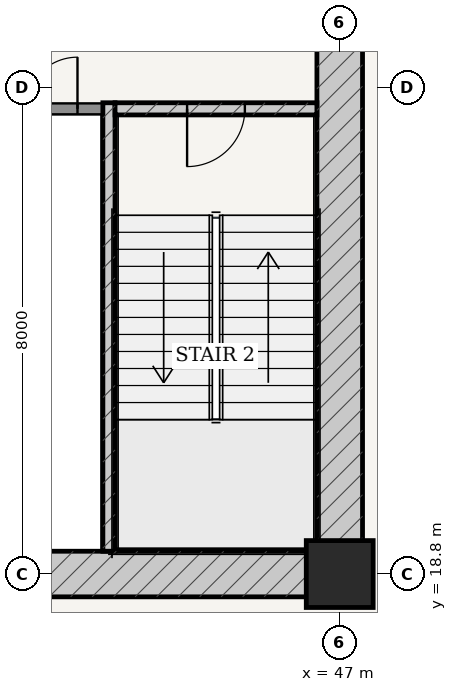
"""IFC4 building model, lengths in metres.
Left out: names, types, materials, properties, quantities, classifications, styles, units other than length and angle.
Written with IfcOpenShell. Run it as: python <this file> out.ifc"""

import sys

from ifc_helpers import new_model, si_unit, direction, frame, frame_2d, origin, origin_2d, place, context, subcontext, project, spatial, rectangle, extrude, source, transform, mapped, element, fill, save


model = new_model("IFC4")
c1 = context("Model", 3, precision=1e-05, world=origin(), true_north=direction((-0.2419218956, 0.970295726276)))
c2 = subcontext(c1, "Body", "Model", "MODEL_VIEW")
j1 = project(units=[si_unit("LENGTHUNIT", "METRE"), si_unit("PLANEANGLEUNIT", "RADIAN")], contexts=[c1])
p1 = place(None, origin())
s1 = spatial("IfcSite", under=j1, at=p1, CompositionType="ELEMENT")
p2 = place(p1, origin())
s2 = spatial("IfcBuilding", under=s1, at=p2, CompositionType="ELEMENT")
p3 = place(p2, frame((0.0, 0.0, 14.4)))
s3 = spatial("IfcBuildingStorey", under=s2, at=p3, CompositionType="ELEMENT", Elevation=14.4)
p4 = place(p3, frame((47.0, 18.8, 0.0), z_axis=(0.0, 0.0, 1.0), x_axis=(1.0, 0.0, 0.0)))
e1 = element("IfcColumn", 1, at=p4, inside=s3, PredefinedType="COLUMN", context=c2, shape_type="SweptSolid", body=[
    extrude(rectangle(XDim=1.1, YDim=1.1, at=origin_2d()), origin(), (0.0, 0.0, 1.0), 4.5),
])
p5 = place(p3, frame((28.625, 18.8, 0.0), z_axis=(0.0, 0.0, 1.0), x_axis=(1.0, 0.0, 0.0)))
e2 = element("IfcWall", 2, at=p5, inside=s3, PredefinedType="SHEAR", context=c2, shape_type="SweptSolid", body=[
    extrude(rectangle(XDim=18.75, YDim=0.75, at=frame_2d((9.375, 0.0))), origin(), (0.0, 0.0, 1.0), 4.05),
])
p6 = place(p5, frame((7.627, 0.0, 0.0)))
e3 = element("IfcOpeningElement", 3, at=p6, cuts=e2, PredefinedType="OPENING", context=c2, shape_type="SweptSolid", body=[
    extrude(rectangle(XDim=0.85, YDim=2.1, at=frame_2d((0.425, 1.05))), frame((0.0, 0.385, 0.0), z_axis=(0.0, -1.0, 0.0), x_axis=(1.0, 0.0, 0.0)), (0.0, 0.0, 1.0), 0.77),
])
p7 = place(p5, frame((10.673, 0.0, 0.0)))
e4 = element("IfcOpeningElement", 4, at=p7, cuts=e2, PredefinedType="OPENING", context=c2, shape_type="SweptSolid", body=[
    extrude(rectangle(XDim=0.85, YDim=2.1, at=frame_2d((0.425, 1.05))), frame((0.0, 0.385, 0.0), z_axis=(0.0, -1.0, 0.0), x_axis=(1.0, 0.0, 0.0)), (0.0, 0.0, 1.0), 0.77),
])
p8 = place(p3, frame((47.0, 19.175, 0.0), z_axis=(0.0, 0.0, 1.0), x_axis=(0.0, 1.0, 0.0)))
e5 = element("IfcWall", 5, at=p8, inside=s3, PredefinedType="SHEAR", context=c2, shape_type="SweptSolid", body=[
    extrude(rectangle(XDim=15.25, YDim=0.75, at=frame_2d((7.625, 0.0))), origin(), (0.0, 0.0, 1.0), 4.05),
])
p9 = place(p8, frame((9.875, 0.0, 0.0)))
e6 = element("IfcOpeningElement", 6, at=p9, cuts=e5, PredefinedType="OPENING", context=c2, shape_type="SweptSolid", body=[
    extrude(rectangle(XDim=1.5, YDim=2.2, at=frame_2d((0.75, 1.1))), frame((0.0, 0.385, 0.0), z_axis=(0.0, -1.0, 0.0), x_axis=(1.0, 0.0, 0.0)), (0.0, 0.0, 1.0), 0.77),
])
p10 = place(p3, frame((43.205, 19.175, 0.0), z_axis=(0.0, 0.0, 1.0), x_axis=(0.0, 1.0, 0.0)))
e7 = element("IfcWall", 7, at=p10, inside=s3, PredefinedType="SOLIDWALL", context=c2, shape_type="SweptSolid", body=[
    extrude(rectangle(XDim=7.375, YDim=0.2, at=frame_2d((3.688, 0.0))), origin(), (0.0, 0.0, 1.0), 4.05),
])
p11 = place(p3, frame((43.305, 26.45, 0.0), z_axis=(0.0, 0.0, 1.0), x_axis=(1.0, 0.0, 0.0)))
e8 = element("IfcWall", 8, at=p11, inside=s3, PredefinedType="SOLIDWALL", context=c2, shape_type="SweptSolid", body=[
    extrude(rectangle(XDim=3.32, YDim=0.2, at=frame_2d((1.66, 0.0))), origin(), (0.0, 0.0, 1.0), 4.05),
])
p12 = place(p11, frame((1.185, 0.0, 0.0)))
e9 = element("IfcOpeningElement", 9, at=p12, cuts=e8, PredefinedType="OPENING", context=c2, shape_type="SweptSolid", body=[
    extrude(rectangle(XDim=0.95, YDim=2.15, at=frame_2d((0.475, 1.075))), frame((0.0, 0.11, 0.0), z_axis=(0.0, -1.0, 0.0), x_axis=(1.0, 0.0, 0.0)), (0.0, 0.0, 1.0), 0.22),
])
p13 = place(p3, frame((41.425, 26.45, 0.0), z_axis=(0.0, 0.0, 1.0), x_axis=(1.0, 0.0, 0.0)))
e10 = element("IfcWall", 10, at=p13, inside=s3, PredefinedType="PARTITIONING", context=c2, shape_type="SweptSolid", body=[
    extrude(rectangle(XDim=1.675, YDim=0.18, at=frame_2d((0.837, 0.0))), origin(), (0.0, 0.0, 1.0), 4.05),
])
p14 = place(p13, frame((0.413, 0.0, 0.0)))
e11 = element("IfcOpeningElement", 11, at=p14, cuts=e10, PredefinedType="OPENING", context=c2, shape_type="SweptSolid", body=[
    extrude(rectangle(XDim=0.85, YDim=2.1, at=frame_2d((0.425, 1.05))), frame((0.0, 0.1, 0.0), z_axis=(0.0, -1.0, 0.0), x_axis=(1.0, 0.0, 0.0)), (0.0, 0.0, 1.0), 0.2),
])
m1 = source(origin(), c2, "Body", "SweptSolid", [
    extrude(rectangle(XDim=0.95, YDim=2.15, at=frame_2d((0.475, 1.075))), frame((0.0, 0.025, 0.0), z_axis=(0.0, -1.0, 0.0), x_axis=(1.0, 0.0, 0.0)), (0.0, 0.0, 1.0), 0.05),
])
p15 = place(p12, frame((0.95, 0.0, 0.0), z_axis=(0.0, 0.0, 1.0), x_axis=(-1.0, 0.0, 0.0)))
e12 = element("IfcDoor", 12, at=p15, inside=s3, OperationType="SINGLE_SWING_RIGHT", PredefinedType="DOOR", context=c2, shape_type="MappedRepresentation", body=[
    mapped(m1, transform((0.0, 0.0, 0.0), scale=1.0)),
])
fill(e9, e12)
m2 = source(origin(), c2, "Body", "SweptSolid", [
    extrude(rectangle(XDim=0.85, YDim=2.1, at=frame_2d((0.425, 1.05))), frame((0.0, 0.025, 0.0), z_axis=(0.0, -1.0, 0.0), x_axis=(1.0, 0.0, 0.0)), (0.0, 0.0, 1.0), 0.05),
])
p16 = place(p14, origin())
e13 = element("IfcDoor", 13, at=p16, inside=s3, OperationType="SINGLE_SWING_RIGHT", PredefinedType="DOOR", context=c2, shape_type="MappedRepresentation", body=[
    mapped(m2, transform((0.0, 0.0, 0.0), scale=1.0)),
])
fill(e11, e13)
save(model, sys.argv[1])
